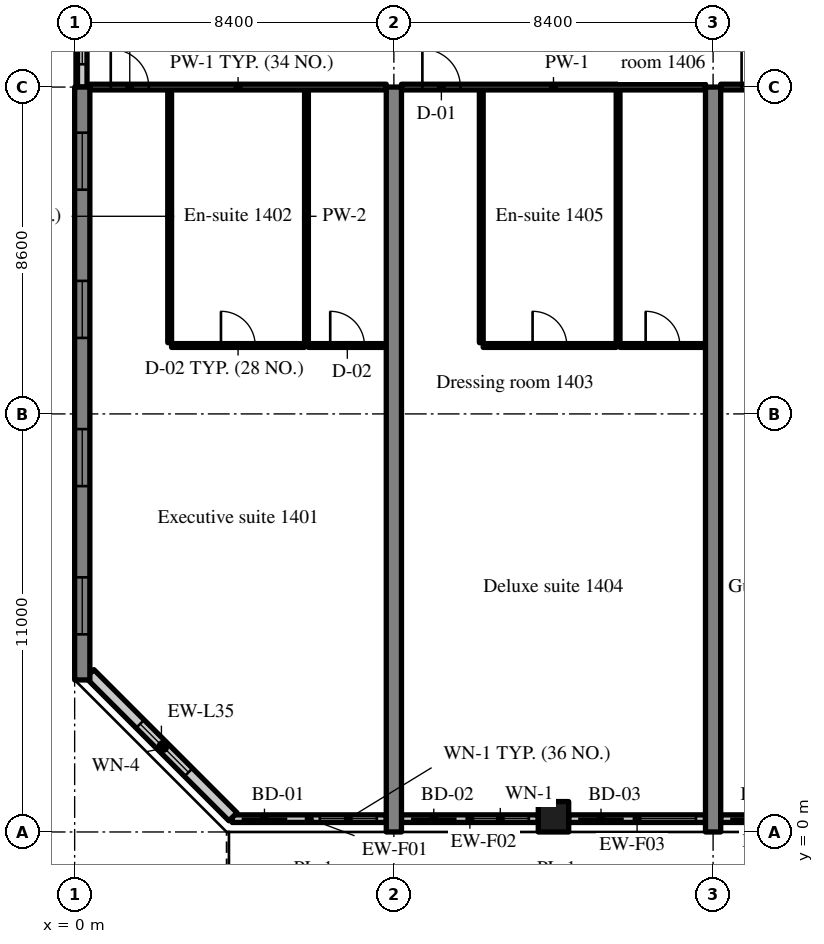
"""IFC4 building model, lengths in metres.
Left out: names, types, materials, properties, quantities, classifications, styles, units other than length and angle.
Written with IfcOpenShell. Run it as: python <this file> out.ifc"""

import sys

from ifc_helpers import new_model, si_unit, direction, frame, frame_2d, origin, origin_2d, place, context, subcontext, project, spatial, rectangle, extrude, source, transform, mapped, element, fill, save


model = new_model("IFC4")
c1 = context("Model", 3, precision=1e-05, world=origin(), true_north=direction((0.0, 1.0)))
c2 = subcontext(c1, "Body", "Model", "MODEL_VIEW")
j1 = project(units=[si_unit("LENGTHUNIT", "METRE"), si_unit("PLANEANGLEUNIT", "RADIAN")], contexts=[c1])
p1 = place(None, origin())
s1 = spatial("IfcSite", under=j1, at=p1, CompositionType="ELEMENT")
p2 = place(p1, origin())
s2 = spatial("IfcBuilding", under=s1, at=p2, CompositionType="ELEMENT")
p3 = place(p2, frame((0.0, 0.0, 62.0)))
s3 = spatial("IfcBuildingStorey", under=s2, at=p3, CompositionType="ELEMENT", Elevation=62.0)
m1 = source(origin(), c2, "Body", "SweptSolid", [
    extrude(rectangle(XDim=15.6, YDim=0.4, at=frame_2d((7.8, 0.0))), origin(), (0.0, 0.0, 1.0), 3.52),
])
p4 = place(p3, frame((0.2, 4.0, 0.0), z_axis=(0.0, 0.0, 1.0), x_axis=(0.0, 1.0, 0.0)))
e1 = element("IfcWall", 1, at=p4, inside=s3, PredefinedType="SHEAR", context=c2, shape_type="MappedRepresentation", body=[
    mapped(m1, transform((0.0, 0.0, 0.0), scale=1.0)),
])
m2 = source(origin(), c2, "Body", "SweptSolid", [
    extrude(rectangle(XDim=1.5, YDim=1.5, at=frame_2d((0.75, 0.75))), frame((0.0, 0.21, 0.0), z_axis=(0.0, -1.0, 0.0), x_axis=(1.0, 0.0, 0.0)), (0.0, 0.0, 1.0), 0.42),
])
p5 = place(p4, frame((1.2, 0.0, 0.9)))
e2 = element("IfcOpeningElement", 2, at=p5, cuts=e1, PredefinedType="OPENING", context=c2, shape_type="MappedRepresentation", body=[
    mapped(m2, transform((0.0, 0.0, 0.0), scale=1.0)),
])
p6 = place(p4, frame((5.1, 0.0, 0.9)))
e3 = element("IfcOpeningElement", 3, at=p6, cuts=e1, PredefinedType="OPENING", context=c2, shape_type="MappedRepresentation", body=[
    mapped(m2, transform((0.0, 0.0, 0.0), scale=1.0)),
])
p7 = place(p4, frame((9.0, 0.0, 0.9)))
e4 = element("IfcOpeningElement", 4, at=p7, cuts=e1, PredefinedType="OPENING", context=c2, shape_type="MappedRepresentation", body=[
    mapped(m2, transform((0.0, 0.0, 0.0), scale=1.0)),
])
p8 = place(p4, frame((12.9, 0.0, 0.9)))
e5 = element("IfcOpeningElement", 5, at=p8, cuts=e1, PredefinedType="OPENING", context=c2, shape_type="MappedRepresentation", body=[
    mapped(m2, transform((0.0, 0.0, 0.0), scale=1.0)),
])
m3 = source(origin(), c2, "Body", "SweptSolid", [
    extrude(rectangle(XDim=19.6, YDim=0.4, at=frame_2d((9.8, 0.0))), origin(), (0.0, 0.0, 1.0), 3.52),
])
for number, where, z_axis, x_axis in (
    (6, (8.4, 0.0, 0.0), (0.0, 0.0, 1.0), (0.0, 1.0, 0.0)),
    (7, (16.8, 0.0, 0.0), (0.0, 0.0, 1.0), (0.0, 1.0, 0.0)),
):
    element("IfcWall", number, at=place(p3, frame(where, z_axis=z_axis, x_axis=x_axis)), inside=s3, PredefinedType="SHEAR", context=c2, shape_type="MappedRepresentation", body=[
        mapped(m3, transform((0.0, 0.0, 0.0), scale=1.0)),
    ])
m4 = source(origin(), c2, "Body", "SweptSolid", [
    extrude(rectangle(XDim=0.8, YDim=0.8, at=origin_2d()), origin(), (0.0, 0.0, 1.0), 3.52),
])
p9 = place(p3, frame((12.6, 0.4, 0.0), z_axis=(0.0, 0.0, 1.0), x_axis=(1.0, 0.0, 0.0)))
e8 = element("IfcColumn", 8, at=p9, inside=s3, PredefinedType="COLUMN", context=c2, shape_type="MappedRepresentation", body=[
    mapped(m4, transform((0.0, 0.0, 0.0), scale=1.0)),
])
m5 = source(origin(), c2, "Body", "SweptSolid", [
    extrude(rectangle(XDim=4.055, YDim=0.2, at=frame_2d((2.027, 0.0))), origin(), (0.0, 0.0, 1.0), 2.82),
])
p10 = place(p3, frame((4.145, 0.35, 0.0), z_axis=(0.0, 0.0, 1.0), x_axis=(1.0, 0.0, 0.0)))
e9 = element("IfcWall", 9, at=p10, inside=s3, PredefinedType="SOLIDWALL", context=c2, shape_type="MappedRepresentation", body=[
    mapped(m5, transform((0.0, 0.0, 0.0), scale=1.0)),
])
m6 = source(origin(), c2, "Body", "SweptSolid", [
    extrude(rectangle(XDim=1.2, YDim=2.4, at=frame_2d((0.6, 1.2))), frame((0.0, 0.11, 0.0), z_axis=(0.0, -1.0, 0.0), x_axis=(1.0, 0.0, 0.0)), (0.0, 0.0, 1.0), 0.22),
])
p11 = place(p10, frame((0.25, 0.0, 0.0)))
e10 = element("IfcOpeningElement", 10, at=p11, cuts=e9, PredefinedType="OPENING", context=c2, shape_type="MappedRepresentation", body=[
    mapped(m6, transform((0.0, 0.0, 0.0), scale=1.0)),
])
m7 = source(origin(), c2, "Body", "SweptSolid", [
    extrude(rectangle(XDim=1.5, YDim=1.5, at=frame_2d((0.75, 0.75))), frame((0.0, 0.11, 0.0), z_axis=(0.0, -1.0, 0.0), x_axis=(1.0, 0.0, 0.0)), (0.0, 0.0, 1.0), 0.22),
])
p12 = place(p10, frame((2.305, 0.0, 0.9)))
e11 = element("IfcOpeningElement", 11, at=p12, cuts=e9, PredefinedType="OPENING", context=c2, shape_type="MappedRepresentation", body=[
    mapped(m7, transform((0.0, 0.0, 0.0), scale=1.0)),
])
m8 = source(origin(), c2, "Body", "SweptSolid", [
    extrude(rectangle(XDim=3.6, YDim=0.2, at=frame_2d((1.8, 0.0))), origin(), (0.0, 0.0, 1.0), 2.82),
])
p13 = place(p3, frame((8.6, 0.35, 0.0), z_axis=(0.0, 0.0, 1.0), x_axis=(1.0, 0.0, 0.0)))
e12 = element("IfcWall", 12, at=p13, inside=s3, PredefinedType="SOLIDWALL", context=c2, shape_type="MappedRepresentation", body=[
    mapped(m8, transform((0.0, 0.0, 0.0), scale=1.0)),
])
p14 = place(p13, frame((0.25, 0.0, 0.0)))
e13 = element("IfcOpeningElement", 13, at=p14, cuts=e12, PredefinedType="OPENING", context=c2, shape_type="MappedRepresentation", body=[
    mapped(m6, transform((0.0, 0.0, 0.0), scale=1.0)),
])
p15 = place(p13, frame((1.85, 0.0, 0.9)))
e14 = element("IfcOpeningElement", 14, at=p15, cuts=e12, PredefinedType="OPENING", context=c2, shape_type="MappedRepresentation", body=[
    mapped(m7, transform((0.0, 0.0, 0.0), scale=1.0)),
])
m9 = source(origin(), c2, "Body", "SweptSolid", [
    extrude(rectangle(XDim=3.6, YDim=0.2, at=frame_2d((1.8, 0.0))), origin(), (0.0, 0.0, 1.0), 2.82),
])
p16 = place(p3, frame((13.0, 0.35, 0.0), z_axis=(0.0, 0.0, 1.0), x_axis=(1.0, 0.0, 0.0)))
e15 = element("IfcWall", 15, at=p16, inside=s3, PredefinedType="SOLIDWALL", context=c2, shape_type="MappedRepresentation", body=[
    mapped(m9, transform((0.0, 0.0, 0.0), scale=1.0)),
])
p17 = place(p16, frame((0.25, 0.0, 0.0)))
e16 = element("IfcOpeningElement", 16, at=p17, cuts=e15, PredefinedType="OPENING", context=c2, shape_type="MappedRepresentation", body=[
    mapped(m6, transform((0.0, 0.0, 0.0), scale=1.0)),
])
p18 = place(p16, frame((1.85, 0.0, 0.9)))
e17 = element("IfcOpeningElement", 17, at=p18, cuts=e15, PredefinedType="OPENING", context=c2, shape_type="MappedRepresentation", body=[
    mapped(m7, transform((0.0, 0.0, 0.0), scale=1.0)),
])
p19 = place(p3, frame((17.0, 0.35, 0.0), z_axis=(0.0, 0.0, 1.0), x_axis=(1.0, 0.0, 0.0)))
e18 = element("IfcWall", 18, at=p19, inside=s3, PredefinedType="SOLIDWALL", context=c2, shape_type="MappedRepresentation", body=[
    mapped(m9, transform((0.0, 0.0, 0.0), scale=1.0)),
])
p20 = place(p19, frame((0.25, 0.0, 0.0)))
e19 = element("IfcOpeningElement", 19, at=p20, cuts=e18, PredefinedType="OPENING", context=c2, shape_type="MappedRepresentation", body=[
    mapped(m6, transform((0.0, 0.0, 0.0), scale=1.0)),
])
p21 = place(p19, frame((1.85, 0.0, 0.9)))
e20 = element("IfcOpeningElement", 20, at=p21, cuts=e18, PredefinedType="OPENING", context=c2, shape_type="MappedRepresentation", body=[
    mapped(m7, transform((0.0, 0.0, 0.0), scale=1.0)),
])
m10 = source(origin(), c2, "Body", "SweptSolid", [
    extrude(rectangle(XDim=5.326, YDim=0.3, at=frame_2d((2.663, 0.0))), origin(), (0.0, 0.0, 1.0), 3.52),
])
p22 = place(p3, frame((0.4, 4.166, 0.0), z_axis=(0.0, 0.0, 1.0), x_axis=(0.707106781187, -0.707106781187, 0.0)))
e21 = element("IfcWall", 21, at=p22, inside=s3, PredefinedType="SOLIDWALL", context=c2, shape_type="MappedRepresentation", body=[
    mapped(m10, transform((0.0, 0.0, 0.0), scale=1.0)),
])
m11 = source(origin(), c2, "Body", "SweptSolid", [
    extrude(rectangle(XDim=1.8, YDim=1.5, at=frame_2d((0.9, 0.75))), frame((0.0, 0.16, 0.0), z_axis=(0.0, -1.0, 0.0), x_axis=(1.0, 0.0, 0.0)), (0.0, 0.0, 1.0), 0.32),
])
p23 = place(p22, frame((1.871, 0.0, 0.9)))
e22 = element("IfcOpeningElement", 22, at=p23, cuts=e21, PredefinedType="OPENING", context=c2, shape_type="MappedRepresentation", body=[
    mapped(m11, transform((0.0, 0.0, 0.0), scale=1.0)),
])
m12 = source(origin(), c2, "Body", "SweptSolid", [
    extrude(rectangle(XDim=2.4, YDim=0.25, at=frame_2d((1.2, 0.0))), origin(), (0.0, 0.0, 1.0), 2.62),
])
p24 = place(p3, frame((0.2, 19.6, 0.0), z_axis=(0.0, 0.0, 1.0), x_axis=(0.0, 1.0, 0.0)))
e23 = element("IfcWall", 23, at=p24, inside=s3, PredefinedType="SOLIDWALL", context=c2, shape_type="MappedRepresentation", body=[
    mapped(m12, transform((0.0, 0.0, 0.0), scale=1.0)),
])
m13 = source(origin(), c2, "Body", "SweptSolid", [
    extrude(rectangle(XDim=1.2, YDim=1.5, at=frame_2d((0.6, 0.75))), frame((0.0, 0.135, 0.0), z_axis=(0.0, -1.0, 0.0), x_axis=(1.0, 0.0, 0.0)), (0.0, 0.0, 1.0), 0.27),
])
p25 = place(p24, frame((0.6, 0.0, 0.9)))
e24 = element("IfcOpeningElement", 24, at=p25, cuts=e23, PredefinedType="OPENING", context=c2, shape_type="MappedRepresentation", body=[
    mapped(m13, transform((0.0, 0.0, 0.0), scale=1.0)),
])
m14 = source(origin(), c2, "Body", "SweptSolid", [
    extrude(rectangle(XDim=6.65, YDim=0.1, at=frame_2d((3.325, 0.0))), origin(), (0.0, 0.0, 1.0), 3.52),
])
for number, where, z_axis, x_axis in (
    (25, (2.5, 12.875, 0.0), (0.0, 0.0, 1.0), (0.0, 1.0, 0.0)),
    (26, (6.1, 12.875, 0.0), (0.0, 0.0, 1.0), (0.0, 1.0, 0.0)),
):
    element("IfcWall", number, at=place(p3, frame(where, z_axis=z_axis, x_axis=x_axis)), inside=s3, PredefinedType="PARTITIONING", context=c2, shape_type="MappedRepresentation", body=[
        mapped(m14, transform((0.0, 0.0, 0.0), scale=1.0)),
    ])
m15 = source(origin(), c2, "Body", "SweptSolid", [
    extrude(rectangle(XDim=3.5, YDim=0.1, at=frame_2d((1.75, 0.0))), origin(), (0.0, 0.0, 1.0), 3.52),
])
p26 = place(p3, frame((2.55, 12.8, 0.0), z_axis=(0.0, 0.0, 1.0), x_axis=(1.0, 0.0, 0.0)))
e27 = element("IfcWall", 27, at=p26, inside=s3, PredefinedType="PARTITIONING", context=c2, shape_type="MappedRepresentation", body=[
    mapped(m15, transform((0.0, 0.0, 0.0), scale=1.0)),
])
m16 = source(origin(), c2, "Body", "SweptSolid", [
    extrude(rectangle(XDim=0.9, YDim=2.1, at=frame_2d((0.45, 1.05))), frame((0.0, 0.06, 0.0), z_axis=(0.0, -1.0, 0.0), x_axis=(1.0, 0.0, 0.0)), (0.0, 0.0, 1.0), 0.12),
])
p27 = place(p26, frame((1.3, 0.0, 0.0)))
e28 = element("IfcOpeningElement", 28, at=p27, cuts=e27, PredefinedType="OPENING", context=c2, shape_type="MappedRepresentation", body=[
    mapped(m16, transform((0.0, 0.0, 0.0), scale=1.0)),
])
m17 = source(origin(), c2, "Body", "SweptSolid", [
    extrude(rectangle(XDim=2.05, YDim=0.1, at=frame_2d((1.025, 0.0))), origin(), (0.0, 0.0, 1.0), 3.52),
])
p28 = place(p3, frame((6.15, 12.8, 0.0), z_axis=(0.0, 0.0, 1.0), x_axis=(1.0, 0.0, 0.0)))
e29 = element("IfcWall", 29, at=p28, inside=s3, PredefinedType="PARTITIONING", context=c2, shape_type="MappedRepresentation", body=[
    mapped(m17, transform((0.0, 0.0, 0.0), scale=1.0)),
])
p29 = place(p28, frame((0.575, 0.0, 0.0)))
e30 = element("IfcOpeningElement", 30, at=p29, cuts=e29, PredefinedType="OPENING", context=c2, shape_type="MappedRepresentation", body=[
    mapped(m16, transform((0.0, 0.0, 0.0), scale=1.0)),
])
m18 = source(origin(), c2, "Body", "SweptSolid", [
    extrude(rectangle(XDim=7.8, YDim=0.15, at=frame_2d((3.9, 0.0))), origin(), (0.0, 0.0, 1.0), 2.82),
])
p30 = place(p3, frame((0.4, 19.6, 0.0), z_axis=(0.0, 0.0, 1.0), x_axis=(1.0, 0.0, 0.0)))
e31 = element("IfcWall", 31, at=p30, inside=s3, PredefinedType="PARTITIONING", context=c2, shape_type="MappedRepresentation", body=[
    mapped(m18, transform((0.0, 0.0, 0.0), scale=1.0)),
])
m19 = source(origin(), c2, "Body", "SweptSolid", [
    extrude(rectangle(XDim=1.0, YDim=2.1, at=frame_2d((0.5, 1.05))), frame((0.0, 0.085, 0.0), z_axis=(0.0, -1.0, 0.0), x_axis=(1.0, 0.0, 0.0)), (0.0, 0.0, 1.0), 0.17),
])
p31 = place(p30, frame((0.55, 0.0, 0.0)))
e32 = element("IfcOpeningElement", 32, at=p31, cuts=e31, PredefinedType="OPENING", context=c2, shape_type="MappedRepresentation", body=[
    mapped(m19, transform((0.0, 0.0, 0.0), scale=1.0)),
])
for number, where, z_axis, x_axis in (
    (33, (10.7, 12.875, 0.0), (0.0, 0.0, 1.0), (0.0, 1.0, 0.0)),
    (34, (14.3, 12.875, 0.0), (0.0, 0.0, 1.0), (0.0, 1.0, 0.0)),
):
    element("IfcWall", number, at=place(p3, frame(where, z_axis=z_axis, x_axis=x_axis)), inside=s3, PredefinedType="PARTITIONING", context=c2, shape_type="MappedRepresentation", body=[
        mapped(m14, transform((0.0, 0.0, 0.0), scale=1.0)),
    ])
p32 = place(p3, frame((10.75, 12.8, 0.0), z_axis=(0.0, 0.0, 1.0), x_axis=(1.0, 0.0, 0.0)))
e35 = element("IfcWall", 35, at=p32, inside=s3, PredefinedType="PARTITIONING", context=c2, shape_type="MappedRepresentation", body=[
    mapped(m15, transform((0.0, 0.0, 0.0), scale=1.0)),
])
p33 = place(p32, frame((1.3, 0.0, 0.0)))
e36 = element("IfcOpeningElement", 36, at=p33, cuts=e35, PredefinedType="OPENING", context=c2, shape_type="MappedRepresentation", body=[
    mapped(m16, transform((0.0, 0.0, 0.0), scale=1.0)),
])
m20 = source(origin(), c2, "Body", "SweptSolid", [
    extrude(rectangle(XDim=2.25, YDim=0.1, at=frame_2d((1.125, 0.0))), origin(), (0.0, 0.0, 1.0), 3.52),
])
p34 = place(p3, frame((14.35, 12.8, 0.0), z_axis=(0.0, 0.0, 1.0), x_axis=(1.0, 0.0, 0.0)))
e37 = element("IfcWall", 37, at=p34, inside=s3, PredefinedType="PARTITIONING", context=c2, shape_type="MappedRepresentation", body=[
    mapped(m20, transform((0.0, 0.0, 0.0), scale=1.0)),
])
p35 = place(p34, frame((0.675, 0.0, 0.0)))
e38 = element("IfcOpeningElement", 38, at=p35, cuts=e37, PredefinedType="OPENING", context=c2, shape_type="MappedRepresentation", body=[
    mapped(m16, transform((0.0, 0.0, 0.0), scale=1.0)),
])
m21 = source(origin(), c2, "Body", "SweptSolid", [
    extrude(rectangle(XDim=8.0, YDim=0.15, at=frame_2d((4.0, 0.0))), origin(), (0.0, 0.0, 1.0), 2.82),
])
p36 = place(p3, frame((8.6, 19.6, 0.0), z_axis=(0.0, 0.0, 1.0), x_axis=(1.0, 0.0, 0.0)))
e39 = element("IfcWall", 39, at=p36, inside=s3, PredefinedType="PARTITIONING", context=c2, shape_type="MappedRepresentation", body=[
    mapped(m21, transform((0.0, 0.0, 0.0), scale=1.0)),
])
p37 = place(p36, frame((0.55, 0.0, 0.0)))
e40 = element("IfcOpeningElement", 40, at=p37, cuts=e39, PredefinedType="OPENING", context=c2, shape_type="MappedRepresentation", body=[
    mapped(m19, transform((0.0, 0.0, 0.0), scale=1.0)),
])
m22 = source(origin(), c2, "Body", "SweptSolid", [
    extrude(rectangle(XDim=3.925, YDim=0.15, at=frame_2d((1.962, 0.0))), origin(), (0.0, 0.0, 1.0), 2.82),
])
p38 = place(p3, frame((17.0, 19.6, 0.0), z_axis=(0.0, 0.0, 1.0), x_axis=(1.0, 0.0, 0.0)))
e41 = element("IfcWall", 41, at=p38, inside=s3, PredefinedType="PARTITIONING", context=c2, shape_type="MappedRepresentation", body=[
    mapped(m22, transform((0.0, 0.0, 0.0), scale=1.0)),
])
p39 = place(p38, frame((0.55, 0.0, 0.0)))
e42 = element("IfcOpeningElement", 42, at=p39, cuts=e41, PredefinedType="OPENING", context=c2, shape_type="MappedRepresentation", body=[
    mapped(m19, transform((0.0, 0.0, 0.0), scale=1.0)),
])
m23 = source(origin(), c2, "Body", "SweptSolid", [
    extrude(rectangle(XDim=1.2, YDim=2.4, at=frame_2d((0.6, 1.2))), frame((0.0, 0.025, 0.0), z_axis=(0.0, -1.0, 0.0), x_axis=(1.0, 0.0, 0.0)), (0.0, 0.0, 1.0), 0.05),
])
p40 = place(p11, origin())
e43 = element("IfcDoor", 43, at=p40, inside=s3, OperationType="SLIDING_TO_LEFT", PredefinedType="DOOR", context=c2, shape_type="MappedRepresentation", body=[
    mapped(m23, transform((0.0, 0.0, 0.0), scale=1.0)),
])
fill(e10, e43)
m24 = source(origin(), c2, "Body", "SweptSolid", [
    extrude(rectangle(XDim=1.5, YDim=1.5, at=frame_2d((0.75, 0.75))), frame((0.0, 0.03, 0.0), z_axis=(0.0, -1.0, 0.0), x_axis=(1.0, 0.0, 0.0)), (0.0, 0.0, 1.0), 0.06),
])
p41 = place(p12, origin())
e44 = element("IfcWindow", 44, at=p41, inside=s3, PartitioningType="SINGLE_PANEL", PredefinedType="WINDOW", context=c2, shape_type="MappedRepresentation", body=[
    mapped(m24, transform((0.0, 0.0, 0.0), scale=1.0)),
])
fill(e11, e44)
p42 = place(p14, origin())
e45 = element("IfcDoor", 45, at=p42, inside=s3, OperationType="SLIDING_TO_RIGHT", PredefinedType="DOOR", context=c2, shape_type="MappedRepresentation", body=[
    mapped(m23, transform((0.0, 0.0, 0.0), scale=1.0)),
])
fill(e13, e45)
p43 = place(p15, origin())
e46 = element("IfcWindow", 46, at=p43, inside=s3, PartitioningType="SINGLE_PANEL", PredefinedType="WINDOW", context=c2, shape_type="MappedRepresentation", body=[
    mapped(m24, transform((0.0, 0.0, 0.0), scale=1.0)),
])
fill(e14, e46)
p44 = place(p17, origin())
e47 = element("IfcDoor", 47, at=p44, inside=s3, OperationType="SLIDING_TO_LEFT", PredefinedType="DOOR", context=c2, shape_type="MappedRepresentation", body=[
    mapped(m23, transform((0.0, 0.0, 0.0), scale=1.0)),
])
fill(e16, e47)
p45 = place(p18, origin())
e48 = element("IfcWindow", 48, at=p45, inside=s3, PartitioningType="SINGLE_PANEL", PredefinedType="WINDOW", context=c2, shape_type="MappedRepresentation", body=[
    mapped(m24, transform((0.0, 0.0, 0.0), scale=1.0)),
])
fill(e17, e48)
p46 = place(p20, origin())
e49 = element("IfcDoor", 49, at=p46, inside=s3, OperationType="SLIDING_TO_RIGHT", PredefinedType="DOOR", context=c2, shape_type="MappedRepresentation", body=[
    mapped(m23, transform((0.0, 0.0, 0.0), scale=1.0)),
])
fill(e19, e49)
m25 = source(origin(), c2, "Body", "SweptSolid", [
    extrude(rectangle(XDim=1.8, YDim=1.5, at=frame_2d((0.9, 0.75))), frame((0.0, 0.03, 0.0), z_axis=(0.0, -1.0, 0.0), x_axis=(1.0, 0.0, 0.0)), (0.0, 0.0, 1.0), 0.06),
])
p47 = place(p23, origin())
e50 = element("IfcWindow", 50, at=p47, inside=s3, PartitioningType="SINGLE_PANEL", PredefinedType="WINDOW", context=c2, shape_type="MappedRepresentation", body=[
    mapped(m25, transform((0.0, 0.0, 0.0), scale=1.0)),
])
fill(e22, e50)
p48 = place(p5, origin())
e51 = element("IfcWindow", 51, at=p48, inside=s3, PartitioningType="SINGLE_PANEL", PredefinedType="WINDOW", context=c2, shape_type="MappedRepresentation", body=[
    mapped(m24, transform((0.0, 0.0, 0.0), scale=1.0)),
])
fill(e2, e51)
p49 = place(p6, origin())
e52 = element("IfcWindow", 52, at=p49, inside=s3, PartitioningType="SINGLE_PANEL", PredefinedType="WINDOW", context=c2, shape_type="MappedRepresentation", body=[
    mapped(m24, transform((0.0, 0.0, 0.0), scale=1.0)),
])
fill(e3, e52)
p50 = place(p7, origin())
e53 = element("IfcWindow", 53, at=p50, inside=s3, PartitioningType="SINGLE_PANEL", PredefinedType="WINDOW", context=c2, shape_type="MappedRepresentation", body=[
    mapped(m24, transform((0.0, 0.0, 0.0), scale=1.0)),
])
fill(e4, e53)
p51 = place(p8, origin())
e54 = element("IfcWindow", 54, at=p51, inside=s3, PartitioningType="SINGLE_PANEL", PredefinedType="WINDOW", context=c2, shape_type="MappedRepresentation", body=[
    mapped(m24, transform((0.0, 0.0, 0.0), scale=1.0)),
])
fill(e5, e54)
m26 = source(origin(), c2, "Body", "SweptSolid", [
    extrude(rectangle(XDim=1.2, YDim=1.5, at=frame_2d((0.6, 0.75))), frame((0.0, 0.03, 0.0), z_axis=(0.0, -1.0, 0.0), x_axis=(1.0, 0.0, 0.0)), (0.0, 0.0, 1.0), 0.06),
])
p52 = place(p25, origin())
e55 = element("IfcWindow", 55, at=p52, inside=s3, PartitioningType="SINGLE_PANEL", PredefinedType="WINDOW", context=c2, shape_type="MappedRepresentation", body=[
    mapped(m26, transform((0.0, 0.0, 0.0), scale=1.0)),
])
fill(e24, e55)
m27 = source(origin(), c2, "Body", "SweptSolid", [
    extrude(rectangle(XDim=0.9, YDim=2.1, at=frame_2d((0.45, 1.05))), frame((0.0, 0.025, 0.0), z_axis=(0.0, -1.0, 0.0), x_axis=(1.0, 0.0, 0.0)), (0.0, 0.0, 1.0), 0.05),
])
p53 = place(p27, origin())
e56 = element("IfcDoor", 56, at=p53, inside=s3, OperationType="SINGLE_SWING_LEFT", PredefinedType="DOOR", context=c2, shape_type="MappedRepresentation", body=[
    mapped(m27, transform((0.0, 0.0, 0.0), scale=1.0)),
])
fill(e28, e56)
p54 = place(p29, origin())
e57 = element("IfcDoor", 57, at=p54, inside=s3, OperationType="SINGLE_SWING_LEFT", PredefinedType="DOOR", context=c2, shape_type="MappedRepresentation", body=[
    mapped(m27, transform((0.0, 0.0, 0.0), scale=1.0)),
])
fill(e30, e57)
m28 = source(origin(), c2, "Body", "SweptSolid", [
    extrude(rectangle(XDim=1.0, YDim=2.1, at=frame_2d((0.5, 1.05))), frame((0.0, 0.025, 0.0), z_axis=(0.0, -1.0, 0.0), x_axis=(1.0, 0.0, 0.0)), (0.0, 0.0, 1.0), 0.05),
])
p55 = place(p31, origin())
e58 = element("IfcDoor", 58, at=p55, inside=s3, OperationType="SINGLE_SWING_LEFT", PredefinedType="DOOR", context=c2, shape_type="MappedRepresentation", body=[
    mapped(m28, transform((0.0, 0.0, 0.0), scale=1.0)),
])
fill(e32, e58)
p56 = place(p33, origin())
e59 = element("IfcDoor", 59, at=p56, inside=s3, OperationType="SINGLE_SWING_LEFT", PredefinedType="DOOR", context=c2, shape_type="MappedRepresentation", body=[
    mapped(m27, transform((0.0, 0.0, 0.0), scale=1.0)),
])
fill(e36, e59)
p57 = place(p35, origin())
e60 = element("IfcDoor", 60, at=p57, inside=s3, OperationType="SINGLE_SWING_LEFT", PredefinedType="DOOR", context=c2, shape_type="MappedRepresentation", body=[
    mapped(m27, transform((0.0, 0.0, 0.0), scale=1.0)),
])
fill(e38, e60)
p58 = place(p37, origin())
e61 = element("IfcDoor", 61, at=p58, inside=s3, OperationType="SINGLE_SWING_LEFT", PredefinedType="DOOR", context=c2, shape_type="MappedRepresentation", body=[
    mapped(m28, transform((0.0, 0.0, 0.0), scale=1.0)),
])
fill(e40, e61)
p59 = place(p39, origin())
e62 = element("IfcDoor", 62, at=p59, inside=s3, OperationType="SINGLE_SWING_LEFT", PredefinedType="DOOR", context=c2, shape_type="MappedRepresentation", body=[
    mapped(m28, transform((0.0, 0.0, 0.0), scale=1.0)),
])
fill(e42, e62)
save(model, sys.argv[1])
